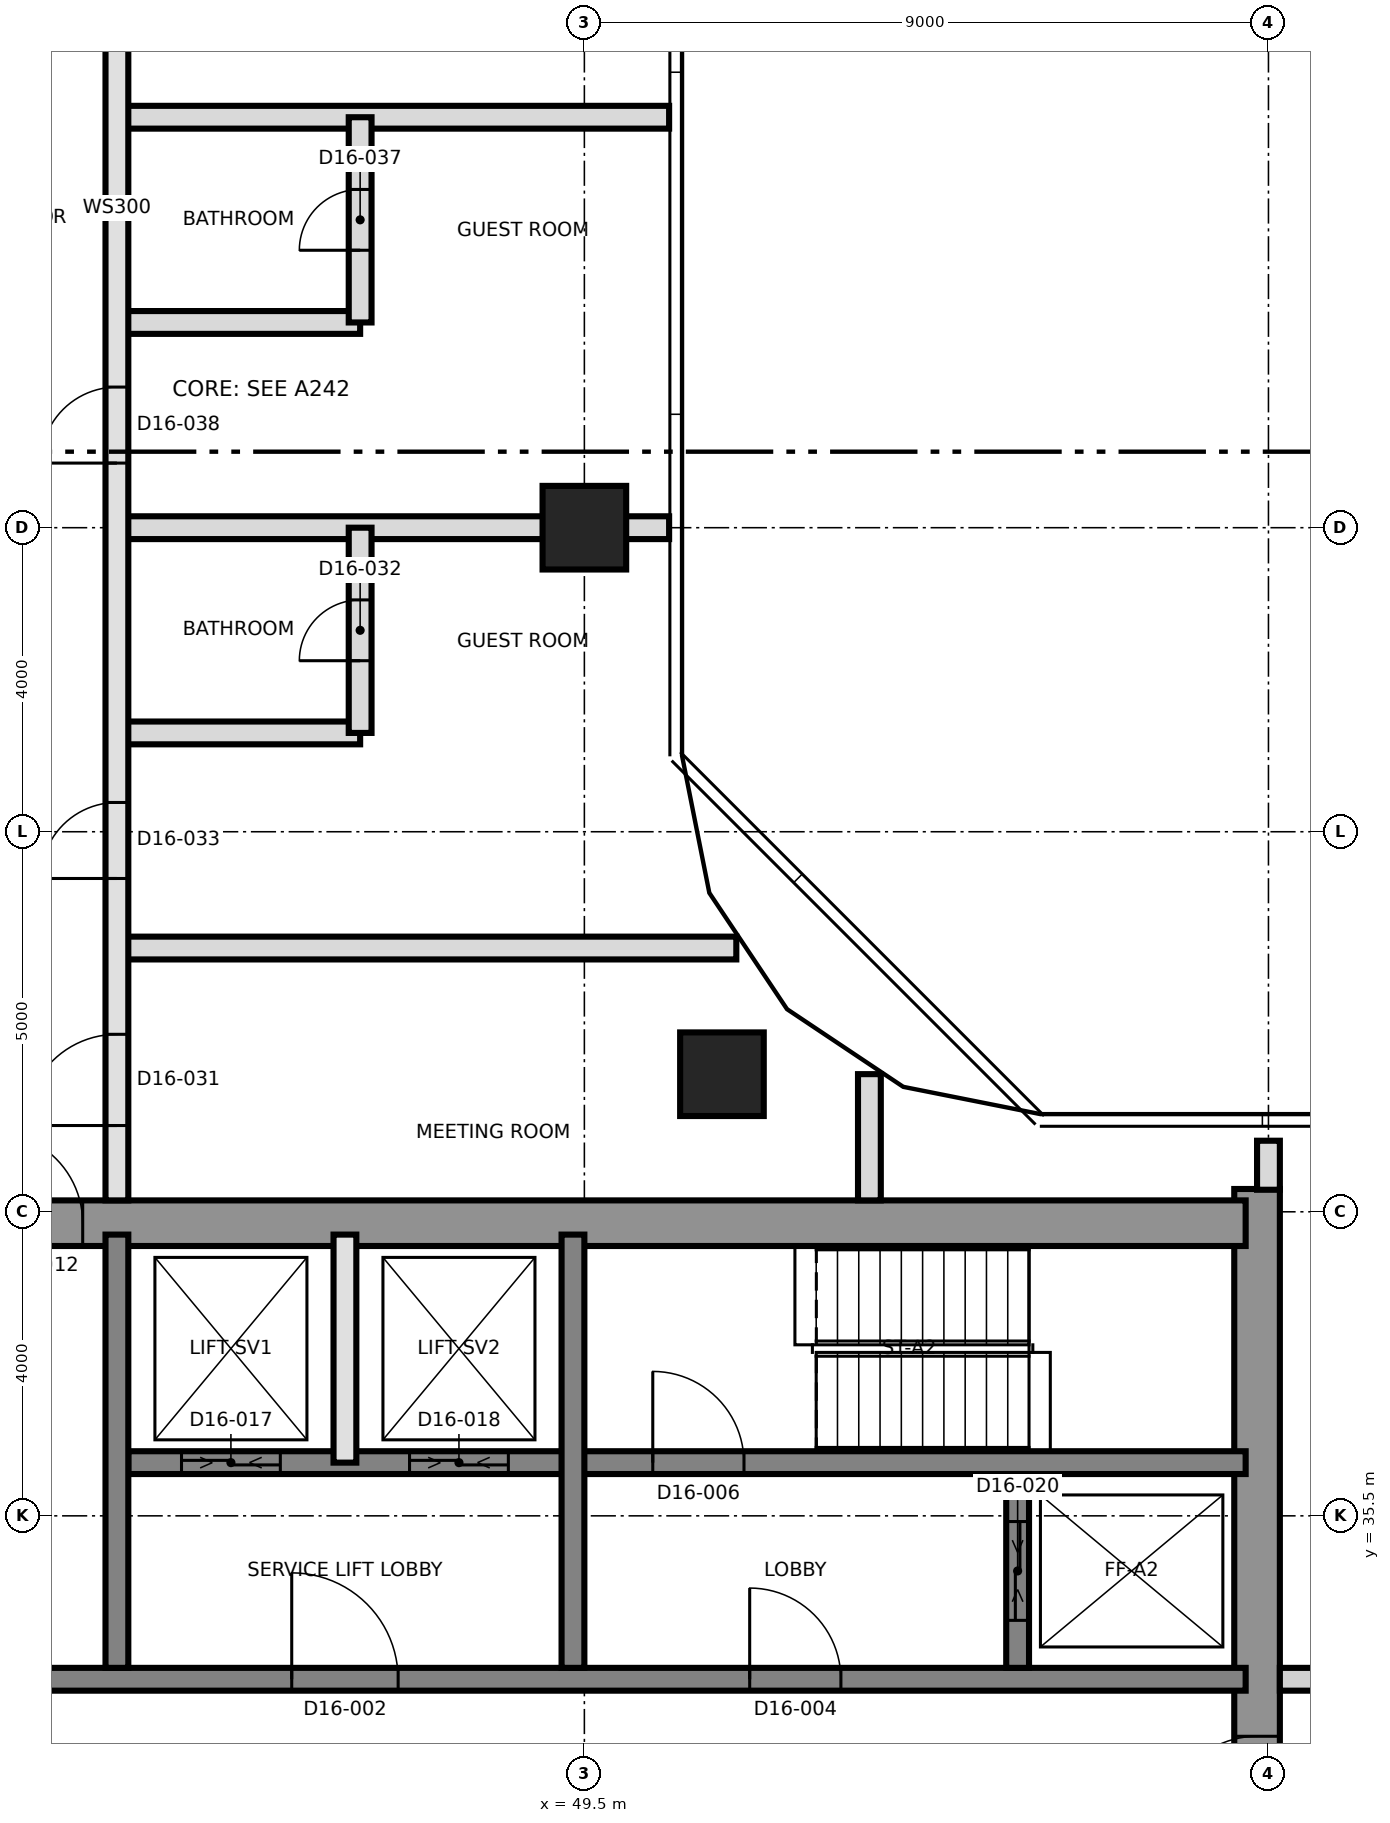
"""IFC4 building model, lengths in metres.
Left out: names, types, materials, properties, quantities, classifications, styles, units other than length and angle.
Written with IfcOpenShell. Run it as: python <this file> out.ifc"""

import sys

from ifc_helpers import new_model, si_unit, direction, frame, frame_2d, origin, origin_2d, place, context, subcontext, project, spatial, rectangle, extrude, element, fill, save


model = new_model("IFC4")
c1 = context("Model", 3, precision=1e-05, world=origin(), true_north=direction((0.0, 1.0)))
c2 = subcontext(c1, "Body", "Model", "MODEL_VIEW")
j1 = project(units=[si_unit("LENGTHUNIT", "METRE"), si_unit("PLANEANGLEUNIT", "RADIAN")], contexts=[c1])
p1 = place(None, origin())
s1 = spatial("IfcSite", under=j1, at=p1, CompositionType="ELEMENT")
p2 = place(p1, origin())
s2 = spatial("IfcBuilding", under=s1, at=p2, CompositionType="ELEMENT")
p3 = place(p2, frame((0.0, 0.0, 160.7)))
s3 = spatial("IfcBuildingStorey", under=s2, at=p3, CompositionType="ELEMENT", Elevation=160.7)
p4 = place(p3, frame((58.35, 21.2, 0.0), z_axis=(0.0, 0.0, 1.0), x_axis=(0.0, 1.0, 0.0)))
e1 = element("IfcWall", 1, at=p4, inside=s3, PredefinedType="SHEAR", context=c2, shape_type="SweptSolid", body=[
    extrude(rectangle(XDim=18.6, YDim=0.6, at=frame_2d((9.3, 0.0))), origin(), (0.0, 0.0, 1.0), 3.7),
])
p5 = place(p4, frame((10.2, 0.0, 0.0)))
e2 = element("IfcOpeningElement", 2, at=p5, cuts=e1, PredefinedType="OPENING", context=c2, shape_type="SweptSolid", body=[
    extrude(rectangle(XDim=1.2, YDim=2.1, at=frame_2d((0.6, 1.05))), frame((0.0, 0.31, 0.0), z_axis=(0.0, -1.0, 0.0), x_axis=(1.0, 0.0, 0.0)), (0.0, 0.0, 1.0), 0.62),
])
p6 = place(p3, frame((31.2, 39.35, 0.0), z_axis=(0.0, 0.0, 1.0), x_axis=(1.0, 0.0, 0.0)))
e3 = element("IfcWall", 3, at=p6, inside=s3, PredefinedType="SHEAR", context=c2, shape_type="SweptSolid", body=[
    extrude(rectangle(XDim=27.0, YDim=0.6, at=frame_2d((13.5, 0.0))), origin(), (0.0, 0.0, 1.0), 3.7),
])
p7 = place(p6, frame((10.5, 0.0, 0.0)))
e4 = element("IfcOpeningElement", 4, at=p7, cuts=e3, PredefinedType="OPENING", context=c2, shape_type="SweptSolid", body=[
    extrude(rectangle(XDim=1.2, YDim=2.1, at=frame_2d((0.6, 1.05))), frame((0.0, 0.31, 0.0), z_axis=(0.0, -1.0, 0.0), x_axis=(1.0, 0.0, 0.0)), (0.0, 0.0, 1.0), 0.62),
])
p8 = place(p3, frame((31.8, 33.35, 0.0), z_axis=(0.0, 0.0, 1.0), x_axis=(1.0, 0.0, 0.0)))
e5 = element("IfcWall", 5, at=p8, inside=s3, PredefinedType="SHEAR", context=c2, shape_type="SweptSolid", body=[
    extrude(rectangle(XDim=26.4, YDim=0.3, at=frame_2d((13.2, 0.0))), origin(), (0.0, 0.0, 1.0), 3.7),
])
p9 = place(p8, frame((13.85, 0.0, 0.0)))
e6 = element("IfcOpeningElement", 6, at=p9, cuts=e5, PredefinedType="OPENING", context=c2, shape_type="SweptSolid", body=[
    extrude(rectangle(XDim=1.4, YDim=2.1, at=frame_2d((0.7, 1.05))), frame((0.0, 0.16, 0.0), z_axis=(0.0, -1.0, 0.0), x_axis=(1.0, 0.0, 0.0)), (0.0, 0.0, 1.0), 0.32),
])
p10 = place(p8, frame((5.325, 0.0, 0.0)))
e7 = element("IfcOpeningElement", 7, at=p10, cuts=e5, PredefinedType="OPENING", context=c2, shape_type="SweptSolid", body=[
    extrude(rectangle(XDim=1.2, YDim=2.1, at=frame_2d((0.6, 1.05))), frame((0.0, 0.16, 0.0), z_axis=(0.0, -1.0, 0.0), x_axis=(1.0, 0.0, 0.0)), (0.0, 0.0, 1.0), 0.32),
])
p11 = place(p8, frame((19.875, 0.0, 0.0)))
e8 = element("IfcOpeningElement", 8, at=p11, cuts=e5, PredefinedType="OPENING", context=c2, shape_type="SweptSolid", body=[
    extrude(rectangle(XDim=1.2, YDim=2.1, at=frame_2d((0.6, 1.05))), frame((0.0, 0.16, 0.0), z_axis=(0.0, -1.0, 0.0), x_axis=(1.0, 0.0, 0.0)), (0.0, 0.0, 1.0), 0.32),
])
p12 = place(p3, frame((43.5, 36.2, 0.0), z_axis=(0.0, 0.0, 1.0), x_axis=(1.0, 0.0, 0.0)))
e9 = element("IfcWall", 9, at=p12, inside=s3, PredefinedType="SHEAR", context=c2, shape_type="SweptSolid", body=[
    extrude(rectangle(XDim=14.7, YDim=0.3, at=frame_2d((7.35, 0.0))), origin(), (0.0, 0.0, 1.0), 3.7),
])
p13 = place(p12, frame((6.9, 0.0, 0.0)))
e10 = element("IfcOpeningElement", 10, at=p13, cuts=e9, PredefinedType="OPENING", context=c2, shape_type="SweptSolid", body=[
    extrude(rectangle(XDim=1.2, YDim=2.1, at=frame_2d((0.6, 1.05))), frame((0.0, 0.16, 0.0), z_axis=(0.0, -1.0, 0.0), x_axis=(1.0, 0.0, 0.0)), (0.0, 0.0, 1.0), 0.32),
])
p14 = place(p12, frame((0.7, 0.0, 0.0)))
e11 = element("IfcOpeningElement", 11, at=p14, cuts=e9, PredefinedType="OPENING", context=c2, shape_type="SweptSolid", body=[
    extrude(rectangle(XDim=1.3, YDim=2.4, at=frame_2d((0.65, 1.2))), frame((0.0, 0.16, 0.0), z_axis=(0.0, -1.0, 0.0), x_axis=(1.0, 0.0, 0.0)), (0.0, 0.0, 1.0), 0.32),
])
p15 = place(p12, frame((3.7, 0.0, 0.0)))
e12 = element("IfcOpeningElement", 12, at=p15, cuts=e9, PredefinedType="OPENING", context=c2, shape_type="SweptSolid", body=[
    extrude(rectangle(XDim=1.3, YDim=2.4, at=frame_2d((0.65, 1.2))), frame((0.0, 0.16, 0.0), z_axis=(0.0, -1.0, 0.0), x_axis=(1.0, 0.0, 0.0)), (0.0, 0.0, 1.0), 0.32),
])
for number, where, z_axis, x_axis in (
    (13, (43.35, 33.5, 0.0), (0.0, 0.0, 1.0), (0.0, 1.0, 0.0)),
    (14, (49.35, 33.5, 0.0), (0.0, 0.0, 1.0), (0.0, 1.0, 0.0)),
):
    element("IfcWall", number, at=place(p3, frame(where, z_axis=z_axis, x_axis=x_axis)), inside=s3, PredefinedType="SHEAR", context=c2, shape_type="SweptSolid", body=[
        extrude(rectangle(XDim=5.7, YDim=0.3, at=frame_2d((2.85, 0.0))), origin(), (0.0, 0.0, 1.0), 3.7),
    ])
p16 = place(p3, frame((55.2, 33.5, 0.0), z_axis=(0.0, 0.0, 1.0), x_axis=(0.0, 1.0, 0.0)))
e15 = element("IfcWall", 15, at=p16, inside=s3, PredefinedType="SHEAR", context=c2, shape_type="SweptSolid", body=[
    extrude(rectangle(XDim=2.55, YDim=0.3, at=frame_2d((1.275, 0.0))), origin(), (0.0, 0.0, 1.0), 3.7),
])
p17 = place(p16, frame((0.625, 0.0, 0.0)))
e16 = element("IfcOpeningElement", 16, at=p17, cuts=e15, PredefinedType="OPENING", context=c2, shape_type="SweptSolid", body=[
    extrude(rectangle(XDim=1.3, YDim=2.4, at=frame_2d((0.65, 1.2))), frame((0.0, 0.16, 0.0), z_axis=(0.0, -1.0, 0.0), x_axis=(1.0, 0.0, 0.0)), (0.0, 0.0, 1.0), 0.32),
])
for number, where, z_axis, x_axis in (
    (17, (51.31, 41.31, 0.0), (0.0, 0.0, 1.0), (1.0, 0.0, 0.0)),
    (18, (49.5, 48.5, 0.0), (0.0, 0.0, 1.0), (1.0, 0.0, 0.0)),
):
    element("IfcColumn", number, at=place(p3, frame(where, z_axis=z_axis, x_axis=x_axis)), inside=s3, PredefinedType="COLUMN", context=c2, shape_type="SweptSolid", body=[
        extrude(rectangle(XDim=1.1, YDim=1.1, at=origin_2d()), origin(), (0.0, 0.0, 1.0), 3.7),
    ])
p18 = place(p3, frame((46.35, 36.2, 0.0), z_axis=(0.0, 0.0, 1.0), x_axis=(0.0, 1.0, 0.0)))
e19 = element("IfcWall", 19, at=p18, inside=s3, PredefinedType="SOLIDWALL", context=c2, shape_type="SweptSolid", body=[
    extrude(rectangle(XDim=3.0, YDim=0.3, at=frame_2d((1.5, 0.0))), origin(), (0.0, 0.0, 1.0), 3.4),
])
p19 = place(p3, frame((58.65, 33.35, 0.0), z_axis=(0.0, 0.0, 1.0), x_axis=(1.0, 0.0, 0.0)))
e20 = element("IfcWall", 20, at=p19, inside=s3, PredefinedType="PARTITIONING", context=c2, shape_type="SweptSolid", body=[
    extrude(rectangle(XDim=8.5, YDim=0.3, at=frame_2d((4.25, 0.0))), origin(), (0.0, 0.0, 1.0), 3.4),
])
p20 = place(p19, frame((2.0, 0.0, 0.0)))
e21 = element("IfcOpeningElement", 21, at=p20, cuts=e20, PredefinedType="OPENING", context=c2, shape_type="SweptSolid", body=[
    extrude(rectangle(XDim=1.0, YDim=2.4, at=frame_2d((0.5, 1.2))), frame((0.0, 0.16, 0.0), z_axis=(0.0, -1.0, 0.0), x_axis=(1.0, 0.0, 0.0)), (0.0, 0.0, 1.0), 0.32),
])
p21 = place(p3, frame((43.35, 42.97, 0.0), z_axis=(0.0, 0.0, 1.0), x_axis=(1.0, 0.0, 0.0)))
e22 = element("IfcWall", 22, at=p21, inside=s3, PredefinedType="PARTITIONING", context=c2, shape_type="SweptSolid", body=[
    extrude(rectangle(XDim=8.149, YDim=0.3, at=frame_2d((4.074, 0.0))), origin(), (0.0, 0.0, 1.0), 3.4),
])
p22 = place(p3, frame((43.35, 45.8, 0.0), z_axis=(0.0, 0.0, 1.0), x_axis=(1.0, 0.0, 0.0)))
e23 = element("IfcWall", 23, at=p22, inside=s3, PredefinedType="PARTITIONING", context=c2, shape_type="SweptSolid", body=[
    extrude(rectangle(XDim=3.2, YDim=0.3, at=frame_2d((1.6, 0.0))), origin(), (0.0, 0.0, 1.0), 3.4),
])
p23 = place(p3, frame((43.35, 48.5, 0.0), z_axis=(0.0, 0.0, 1.0), x_axis=(1.0, 0.0, 0.0)))
e24 = element("IfcWall", 24, at=p23, inside=s3, PredefinedType="PARTITIONING", context=c2, shape_type="SweptSolid", body=[
    extrude(rectangle(XDim=7.265, YDim=0.3, at=frame_2d((3.632, 0.0))), origin(), (0.0, 0.0, 1.0), 3.4),
])
p24 = place(p3, frame((43.35, 51.2, 0.0), z_axis=(0.0, 0.0, 1.0), x_axis=(1.0, 0.0, 0.0)))
e25 = element("IfcWall", 25, at=p24, inside=s3, PredefinedType="PARTITIONING", context=c2, shape_type="SweptSolid", body=[
    extrude(rectangle(XDim=3.2, YDim=0.3, at=frame_2d((1.6, 0.0))), origin(), (0.0, 0.0, 1.0), 3.4),
])
p25 = place(p3, frame((43.35, 53.9, 0.0), z_axis=(0.0, 0.0, 1.0), x_axis=(1.0, 0.0, 0.0)))
e26 = element("IfcWall", 26, at=p25, inside=s3, PredefinedType="PARTITIONING", context=c2, shape_type="SweptSolid", body=[
    extrude(rectangle(XDim=7.265, YDim=0.3, at=frame_2d((3.632, 0.0))), origin(), (0.0, 0.0, 1.0), 3.4),
])
p26 = place(p3, frame((43.35, 39.65, 0.0), z_axis=(0.0, 0.0, 1.0), x_axis=(0.0, 1.0, 0.0)))
e27 = element("IfcWall", 27, at=p26, inside=s3, PredefinedType="SOLIDWALL", context=c2, shape_type="SweptSolid", body=[
    extrude(rectangle(XDim=26.1, YDim=0.3, at=frame_2d((13.05, 0.0))), origin(), (0.0, 0.0, 1.0), 3.4),
])
p27 = place(p26, frame((0.985, 0.0, 0.0)))
e28 = element("IfcOpeningElement", 28, at=p27, cuts=e27, PredefinedType="OPENING", context=c2, shape_type="SweptSolid", body=[
    extrude(rectangle(XDim=1.2, YDim=2.1, at=frame_2d((0.6, 1.05))), frame((0.0, 0.16, 0.0), z_axis=(0.0, -1.0, 0.0), x_axis=(1.0, 0.0, 0.0)), (0.0, 0.0, 1.0), 0.32),
])
p28 = place(p26, frame((4.235, 0.0, 0.0)))
e29 = element("IfcOpeningElement", 29, at=p28, cuts=e27, PredefinedType="OPENING", context=c2, shape_type="SweptSolid", body=[
    extrude(rectangle(XDim=1.0, YDim=2.1, at=frame_2d((0.5, 1.05))), frame((0.0, 0.16, 0.0), z_axis=(0.0, -1.0, 0.0), x_axis=(1.0, 0.0, 0.0)), (0.0, 0.0, 1.0), 0.32),
])
p29 = place(p26, frame((9.7, 0.0, 0.0)))
e30 = element("IfcOpeningElement", 30, at=p29, cuts=e27, PredefinedType="OPENING", context=c2, shape_type="SweptSolid", body=[
    extrude(rectangle(XDim=1.0, YDim=2.1, at=frame_2d((0.5, 1.05))), frame((0.0, 0.16, 0.0), z_axis=(0.0, -1.0, 0.0), x_axis=(1.0, 0.0, 0.0)), (0.0, 0.0, 1.0), 0.32),
])
p30 = place(p26, frame((15.55, 0.0, 0.0)))
e31 = element("IfcOpeningElement", 31, at=p30, cuts=e27, PredefinedType="OPENING", context=c2, shape_type="SweptSolid", body=[
    extrude(rectangle(XDim=1.0, YDim=2.1, at=frame_2d((0.5, 1.05))), frame((0.0, 0.16, 0.0), z_axis=(0.0, -1.0, 0.0), x_axis=(1.0, 0.0, 0.0)), (0.0, 0.0, 1.0), 0.32),
])
p31 = place(p26, frame((19.85, 0.0, 0.0)))
e32 = element("IfcOpeningElement", 32, at=p31, cuts=e27, PredefinedType="OPENING", context=c2, shape_type="SweptSolid", body=[
    extrude(rectangle(XDim=1.0, YDim=2.4, at=frame_2d((0.5, 1.2))), frame((0.0, 0.16, 0.0), z_axis=(0.0, -1.0, 0.0), x_axis=(1.0, 0.0, 0.0)), (0.0, 0.0, 1.0), 0.32),
])
p32 = place(p3, frame((46.55, 45.8, 0.0), z_axis=(0.0, 0.0, 1.0), x_axis=(0.0, 1.0, 0.0)))
e33 = element("IfcWall", 33, at=p32, inside=s3, PredefinedType="PARTITIONING", context=c2, shape_type="SweptSolid", body=[
    extrude(rectangle(XDim=2.7, YDim=0.3, at=frame_2d((1.35, 0.0))), origin(), (0.0, 0.0, 1.0), 3.4),
])
p33 = place(p32, frame((0.95, 0.0, 0.0)))
e34 = element("IfcOpeningElement", 34, at=p33, cuts=e33, PredefinedType="OPENING", context=c2, shape_type="SweptSolid", body=[
    extrude(rectangle(XDim=0.8, YDim=2.1, at=frame_2d((0.4, 1.05))), frame((0.0, 0.16, 0.0), z_axis=(0.0, -1.0, 0.0), x_axis=(1.0, 0.0, 0.0)), (0.0, 0.0, 1.0), 0.32),
])
p34 = place(p3, frame((46.55, 51.2, 0.0), z_axis=(0.0, 0.0, 1.0), x_axis=(0.0, 1.0, 0.0)))
e35 = element("IfcWall", 35, at=p34, inside=s3, PredefinedType="PARTITIONING", context=c2, shape_type="SweptSolid", body=[
    extrude(rectangle(XDim=2.7, YDim=0.3, at=frame_2d((1.35, 0.0))), origin(), (0.0, 0.0, 1.0), 3.4),
])
p35 = place(p34, frame((0.95, 0.0, 0.0)))
e36 = element("IfcOpeningElement", 36, at=p35, cuts=e35, PredefinedType="OPENING", context=c2, shape_type="SweptSolid", body=[
    extrude(rectangle(XDim=0.8, YDim=2.1, at=frame_2d((0.4, 1.05))), frame((0.0, 0.16, 0.0), z_axis=(0.0, -1.0, 0.0), x_axis=(1.0, 0.0, 0.0)), (0.0, 0.0, 1.0), 0.32),
])
p36 = place(p3, frame((53.25, 39.65, 0.0), z_axis=(0.0, 0.0, 1.0), x_axis=(0.0, 1.0, 0.0)))
e37 = element("IfcWall", 37, at=p36, inside=s3, PredefinedType="PARTITIONING", context=c2, shape_type="SweptSolid", body=[
    extrude(rectangle(XDim=1.661, YDim=0.3, at=frame_2d((0.831, 0.0))), origin(), (0.0, 0.0, 1.0), 3.4),
])
p37 = place(p3, frame((58.5, 39.79, 0.0), z_axis=(0.0, 0.0, 1.0), x_axis=(0.0, 1.0, 0.0)))
e38 = element("IfcWall", 38, at=p37, inside=s3, PredefinedType="PARTITIONING", context=c2, shape_type="SweptSolid", body=[
    extrude(rectangle(XDim=0.645, YDim=0.3, at=frame_2d((0.323, 0.0))), origin(), (0.0, 0.0, 1.0), 3.4),
])
p38 = place(p9, origin())
e39 = element("IfcDoor", 39, at=p38, inside=s3, OperationType="SINGLE_SWING_RIGHT", PredefinedType="DOOR", context=c2, shape_type="SweptSolid", body=[
    extrude(rectangle(XDim=1.4, YDim=2.1, at=frame_2d((0.7, 1.05))), frame((0.0, 0.025, 0.0), z_axis=(0.0, -1.0, 0.0), x_axis=(1.0, 0.0, 0.0)), (0.0, 0.0, 1.0), 0.05),
])
fill(e6, e39)
p39 = place(p11, origin())
e40 = element("IfcDoor", 40, at=p39, inside=s3, OperationType="SINGLE_SWING_RIGHT", PredefinedType="DOOR", context=c2, shape_type="SweptSolid", body=[
    extrude(rectangle(XDim=1.2, YDim=2.1, at=frame_2d((0.6, 1.05))), frame((0.0, 0.025, 0.0), z_axis=(0.0, -1.0, 0.0), x_axis=(1.0, 0.0, 0.0)), (0.0, 0.0, 1.0), 0.05),
])
fill(e8, e40)
p40 = place(p13, origin())
e41 = element("IfcDoor", 41, at=p40, inside=s3, OperationType="SINGLE_SWING_LEFT", PredefinedType="DOOR", context=c2, shape_type="SweptSolid", body=[
    extrude(rectangle(XDim=1.2, YDim=2.1, at=frame_2d((0.6, 1.05))), frame((0.0, 0.025, 0.0), z_axis=(0.0, -1.0, 0.0), x_axis=(1.0, 0.0, 0.0)), (0.0, 0.0, 1.0), 0.05),
])
fill(e10, e41)
p41 = place(p5, origin())
e42 = element("IfcDoor", 42, at=p41, inside=s3, OperationType="SINGLE_SWING_LEFT", PredefinedType="DOOR", context=c2, shape_type="SweptSolid", body=[
    extrude(rectangle(XDim=1.2, YDim=2.1, at=frame_2d((0.6, 1.05))), frame((0.0, 0.025, 0.0), z_axis=(0.0, -1.0, 0.0), x_axis=(1.0, 0.0, 0.0)), (0.0, 0.0, 1.0), 0.05),
])
fill(e2, e42)
p42 = place(p7, origin())
e43 = element("IfcDoor", 43, at=p42, inside=s3, OperationType="SINGLE_SWING_RIGHT", PredefinedType="DOOR", context=c2, shape_type="SweptSolid", body=[
    extrude(rectangle(XDim=1.2, YDim=2.1, at=frame_2d((0.6, 1.05))), frame((0.0, 0.025, 0.0), z_axis=(0.0, -1.0, 0.0), x_axis=(1.0, 0.0, 0.0)), (0.0, 0.0, 1.0), 0.05),
])
fill(e4, e43)
p43 = place(p14, origin())
e44 = element("IfcDoor", 44, at=p43, inside=s3, OperationType="SLIDING_TO_LEFT", PredefinedType="DOOR", context=c2, shape_type="SweptSolid", body=[
    extrude(rectangle(XDim=1.3, YDim=2.4, at=frame_2d((0.65, 1.2))), frame((0.0, 0.025, 0.0), z_axis=(0.0, -1.0, 0.0), x_axis=(1.0, 0.0, 0.0)), (0.0, 0.0, 1.0), 0.05),
])
fill(e11, e44)
p44 = place(p15, origin())
e45 = element("IfcDoor", 45, at=p44, inside=s3, OperationType="SLIDING_TO_LEFT", PredefinedType="DOOR", context=c2, shape_type="SweptSolid", body=[
    extrude(rectangle(XDim=1.3, YDim=2.4, at=frame_2d((0.65, 1.2))), frame((0.0, 0.025, 0.0), z_axis=(0.0, -1.0, 0.0), x_axis=(1.0, 0.0, 0.0)), (0.0, 0.0, 1.0), 0.05),
])
fill(e12, e45)
p45 = place(p17, origin())
e46 = element("IfcDoor", 46, at=p45, inside=s3, OperationType="SLIDING_TO_LEFT", PredefinedType="DOOR", context=c2, shape_type="SweptSolid", body=[
    extrude(rectangle(XDim=1.3, YDim=2.4, at=frame_2d((0.65, 1.2))), frame((0.0, 0.025, 0.0), z_axis=(0.0, -1.0, 0.0), x_axis=(1.0, 0.0, 0.0)), (0.0, 0.0, 1.0), 0.05),
])
fill(e16, e46)
p46 = place(p27, origin())
e47 = element("IfcDoor", 47, at=p46, inside=s3, OperationType="SINGLE_SWING_RIGHT", PredefinedType="DOOR", context=c2, shape_type="SweptSolid", body=[
    extrude(rectangle(XDim=1.2, YDim=2.1, at=frame_2d((0.6, 1.05))), frame((0.0, 0.025, 0.0), z_axis=(0.0, -1.0, 0.0), x_axis=(1.0, 0.0, 0.0)), (0.0, 0.0, 1.0), 0.05),
])
fill(e28, e47)
p47 = place(p33, origin())
e48 = element("IfcDoor", 48, at=p47, inside=s3, OperationType="SINGLE_SWING_LEFT", PredefinedType="DOOR", context=c2, shape_type="SweptSolid", body=[
    extrude(rectangle(XDim=0.8, YDim=2.1, at=frame_2d((0.4, 1.05))), frame((0.0, 0.025, 0.0), z_axis=(0.0, -1.0, 0.0), x_axis=(1.0, 0.0, 0.0)), (0.0, 0.0, 1.0), 0.05),
])
fill(e34, e48)
p48 = place(p28, origin())
e49 = element("IfcDoor", 49, at=p48, inside=s3, OperationType="SINGLE_SWING_LEFT", PredefinedType="DOOR", context=c2, shape_type="SweptSolid", body=[
    extrude(rectangle(XDim=1.0, YDim=2.1, at=frame_2d((0.5, 1.05))), frame((0.0, 0.025, 0.0), z_axis=(0.0, -1.0, 0.0), x_axis=(1.0, 0.0, 0.0)), (0.0, 0.0, 1.0), 0.05),
])
fill(e29, e49)
p49 = place(p35, origin())
e50 = element("IfcDoor", 50, at=p49, inside=s3, OperationType="SINGLE_SWING_LEFT", PredefinedType="DOOR", context=c2, shape_type="SweptSolid", body=[
    extrude(rectangle(XDim=0.8, YDim=2.1, at=frame_2d((0.4, 1.05))), frame((0.0, 0.025, 0.0), z_axis=(0.0, -1.0, 0.0), x_axis=(1.0, 0.0, 0.0)), (0.0, 0.0, 1.0), 0.05),
])
fill(e36, e50)
p50 = place(p29, origin())
e51 = element("IfcDoor", 51, at=p50, inside=s3, OperationType="SINGLE_SWING_RIGHT", PredefinedType="DOOR", context=c2, shape_type="SweptSolid", body=[
    extrude(rectangle(XDim=1.0, YDim=2.1, at=frame_2d((0.5, 1.05))), frame((0.0, 0.025, 0.0), z_axis=(0.0, -1.0, 0.0), x_axis=(1.0, 0.0, 0.0)), (0.0, 0.0, 1.0), 0.05),
])
fill(e30, e51)
save(model, sys.argv[1])
